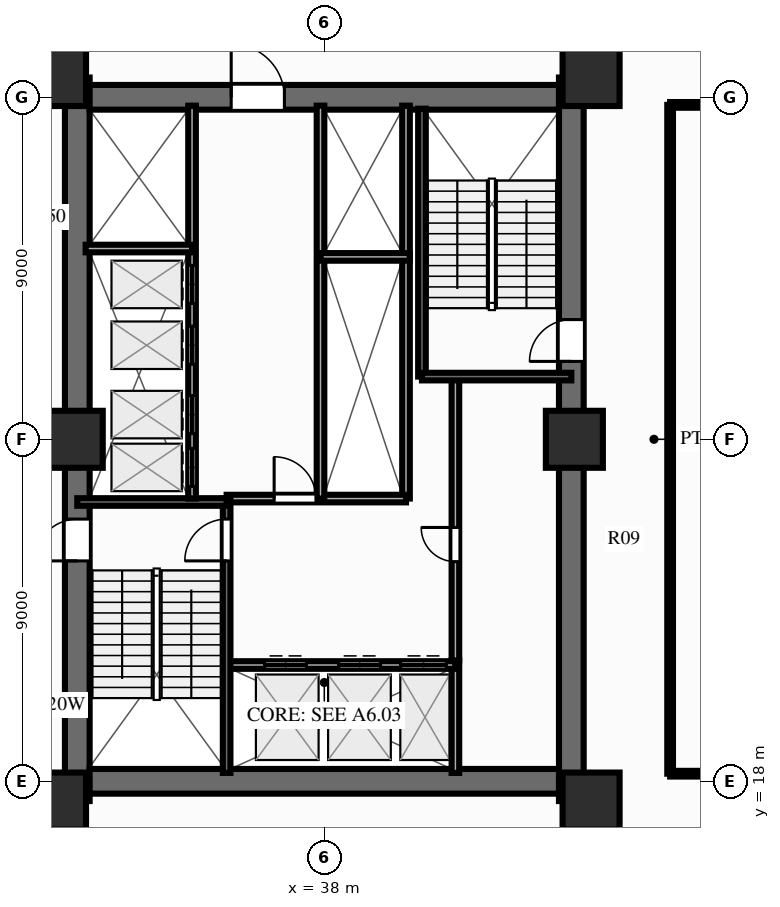
"""IFC4 building model, lengths in metres.
Left out: names, types, materials, properties, quantities, classifications, styles, units other than length and angle.
Written with IfcOpenShell. Run it as: python <this file> out.ifc"""

import sys

from ifc_helpers import new_model, si_unit, direction, frame, frame_2d, origin, origin_2d, place, context, subcontext, project, spatial, rectangle, extrude, source, transform, mapped, element, fill, save


model = new_model("IFC4")
c1 = context("Model", 3, precision=1e-05, world=origin(), true_north=direction((0.0, 1.0)))
c2 = subcontext(c1, "Body", "Model", "MODEL_VIEW")
j1 = project(units=[si_unit("LENGTHUNIT", "METRE"), si_unit("PLANEANGLEUNIT", "RADIAN")], contexts=[c1])
p1 = place(None, origin())
s1 = spatial("IfcSite", under=j1, at=p1, CompositionType="ELEMENT")
p2 = place(p1, origin())
s2 = spatial("IfcBuilding", under=s1, at=p2, CompositionType="ELEMENT")
p3 = place(p2, frame((0.0, 0.0, 15.0)))
s3 = spatial("IfcBuildingStorey", under=s2, at=p3, CompositionType="ELEMENT", Elevation=15.0)
p4 = place(p3, frame((31.5, 17.48, 0.0), z_axis=(0.0, 0.0, 1.0), x_axis=(0.0, 1.0, 0.0)))
e1 = element("IfcWall", 1, at=p4, inside=s3, PredefinedType="SHEAR", context=c2, shape_type="SweptSolid", body=[
    extrude(rectangle(XDim=19.04, YDim=0.65, at=frame_2d((9.52, 0.0))), origin(), (0.0, 0.0, 1.0), 4.4),
])
p5 = place(p4, frame((6.32, 0.0, 0.0)))
e2 = element("IfcOpeningElement", 2, at=p5, cuts=e1, PredefinedType="OPENING", context=c2, shape_type="SweptSolid", body=[
    extrude(rectangle(XDim=1.1, YDim=2.15, at=frame_2d((0.55, 1.075))), frame((0.0, 0.337, 0.0), z_axis=(0.0, -1.0, 0.0), x_axis=(1.0, 0.0, 0.0)), (0.0, 0.0, 1.0), 0.674),
])
p6 = place(p3, frame((44.5, 17.48, 0.0), z_axis=(0.0, 0.0, 1.0), x_axis=(0.0, 1.0, 0.0)))
e3 = element("IfcWall", 3, at=p6, inside=s3, PredefinedType="SHEAR", context=c2, shape_type="SweptSolid", body=[
    extrude(rectangle(XDim=19.04, YDim=0.65, at=frame_2d((9.52, 0.0))), origin(), (0.0, 0.0, 1.0), 4.4),
])
p7 = place(p6, frame((12.67, 0.0, 0.0), z_axis=(0.0, 0.0, 1.0), x_axis=(-1.0, 0.0, 0.0)))
e4 = element("IfcOpeningElement", 4, at=p7, cuts=e3, PredefinedType="OPENING", context=c2, shape_type="SweptSolid", body=[
    extrude(rectangle(XDim=1.1, YDim=2.15, at=frame_2d((0.55, 1.075))), frame((0.0, 0.337, 0.0), z_axis=(0.0, -1.0, 0.0), x_axis=(1.0, 0.0, 0.0)), (0.0, 0.0, 1.0), 0.674),
])
p8 = place(p3, frame((31.825, 18.0, 0.0), z_axis=(0.0, 0.0, 1.0), x_axis=(1.0, 0.0, 0.0)))
e5 = element("IfcWall", 5, at=p8, inside=s3, PredefinedType="SHEAR", context=c2, shape_type="SweptSolid", body=[
    extrude(rectangle(XDim=12.35, YDim=0.65, at=frame_2d((6.175, 0.0))), origin(), (0.0, 0.0, 1.0), 4.4),
])
p9 = place(p3, frame((31.825, 36.0, 0.0), z_axis=(0.0, 0.0, 1.0), x_axis=(1.0, 0.0, 0.0)))
e6 = element("IfcWall", 6, at=p9, inside=s3, PredefinedType="SHEAR", context=c2, shape_type="SweptSolid", body=[
    extrude(rectangle(XDim=12.35, YDim=0.65, at=frame_2d((6.175, 0.0))), origin(), (0.0, 0.0, 1.0), 4.4),
])
p10 = place(p9, frame((5.125, 0.0, 0.0), z_axis=(0.0, 0.0, 1.0), x_axis=(-1.0, 0.0, 0.0)))
e7 = element("IfcOpeningElement", 7, at=p10, cuts=e6, PredefinedType="OPENING", context=c2, shape_type="SweptSolid", body=[
    extrude(rectangle(XDim=1.4, YDim=2.15, at=frame_2d((0.7, 1.075))), frame((0.0, 0.337, 0.0), z_axis=(0.0, -1.0, 0.0), x_axis=(1.0, 0.0, 0.0)), (0.0, 0.0, 1.0), 0.674),
])
m1 = source(origin(), c2, "Body", "SweptSolid", [
    extrude(rectangle(XDim=1.5, YDim=1.5, at=origin_2d()), origin(), (0.0, 0.0, 1.0), 4.4),
])
for number, where, z_axis, x_axis in (
    (8, (30.98, 17.48, 0.0), (0.0, 0.0, 1.0), (1.0, 0.0, 0.0)),
    (9, (45.02, 17.48, 0.0), (0.0, 0.0, 1.0), (1.0, 0.0, 0.0)),
    (10, (30.98, 36.52, 0.0), (0.0, 0.0, 1.0), (1.0, 0.0, 0.0)),
    (11, (45.02, 36.52, 0.0), (0.0, 0.0, 1.0), (1.0, 0.0, 0.0)),
    (12, (31.42, 27.0, 0.0), (0.0, 0.0, 1.0), (1.0, 0.0, 0.0)),
    (13, (44.58, 27.0, 0.0), (0.0, 0.0, 1.0), (1.0, 0.0, 0.0)),
):
    element("IfcColumn", number, at=place(p3, frame(where, z_axis=z_axis, x_axis=x_axis)), inside=s3, PredefinedType="COLUMN", context=c2, shape_type="MappedRepresentation", body=[
        mapped(m1, transform((0.0, 0.0, 0.0), scale=1.0)),
    ])
p11 = place(p3, frame((41.45, 18.22, 0.0), z_axis=(0.0, 0.0, 1.0), x_axis=(0.0, 1.0, 0.0)))
e14 = element("IfcWall", 14, at=p11, inside=s3, PredefinedType="PARTITIONING", context=c2, shape_type="SweptSolid", body=[
    extrude(rectangle(XDim=2.96, YDim=0.2, at=frame_2d((1.48, 0.0))), origin(), (0.0, 0.0, 1.0), 4.08),
])
p12 = place(p3, frame((41.45, 21.18, 0.0), z_axis=(0.0, 0.0, 1.0), x_axis=(0.0, 1.0, 0.0)))
e15 = element("IfcWall", 15, at=p12, inside=s3, PredefinedType="PARTITIONING", context=c2, shape_type="SweptSolid", body=[
    extrude(rectangle(XDim=7.42, YDim=0.2, at=frame_2d((3.71, 0.0))), origin(), (0.0, 0.0, 1.0), 4.08),
])
p13 = place(p12, frame((2.6, 0.0, 0.0)))
e16 = element("IfcOpeningElement", 16, at=p13, cuts=e15, PredefinedType="OPENING", context=c2, shape_type="SweptSolid", body=[
    extrude(rectangle(XDim=0.9, YDim=2.1, at=frame_2d((0.45, 1.05))), frame((0.0, 0.112, 0.0), z_axis=(0.0, -1.0, 0.0), x_axis=(1.0, 0.0, 0.0)), (0.0, 0.0, 1.0), 0.224),
])
p14 = place(p3, frame((40.15, 25.44, 0.0), z_axis=(0.0, 0.0, 1.0), x_axis=(0.0, 1.0, 0.0)))
e17 = element("IfcWall", 17, at=p14, inside=s3, PredefinedType="PARTITIONING", context=c2, shape_type="SweptSolid", body=[
    extrude(rectangle(XDim=6.36, YDim=0.2, at=frame_2d((3.18, 0.0))), origin(), (0.0, 0.0, 1.0), 4.08),
])
p15 = place(p3, frame((40.15, 31.8, 0.0), z_axis=(0.0, 0.0, 1.0), x_axis=(0.0, 1.0, 0.0)))
e18 = element("IfcWall", 18, at=p15, inside=s3, PredefinedType="PARTITIONING", context=c2, shape_type="SweptSolid", body=[
    extrude(rectangle(XDim=3.98, YDim=0.2, at=frame_2d((1.99, 0.0))), origin(), (0.0, 0.0, 1.0), 4.08),
])
p16 = place(p3, frame((35.43, 21.06, 0.0), z_axis=(0.0, 0.0, 1.0), x_axis=(1.0, 0.0, 0.0)))
e19 = element("IfcWall", 19, at=p16, inside=s3, PredefinedType="PARTITIONING", context=c2, shape_type="SweptSolid", body=[
    extrude(rectangle(XDim=6.02, YDim=0.2, at=frame_2d((3.01, 0.0))), origin(), (0.0, 0.0, 1.0), 4.08),
])
p17 = place(p16, frame((1.0, 0.0, 0.0)))
e20 = element("IfcOpeningElement", 20, at=p17, cuts=e19, PredefinedType="OPENING", context=c2, shape_type="SweptSolid", body=[
    extrude(rectangle(XDim=1.1, YDim=2.15, at=frame_2d((0.55, 1.075))), frame((0.0, 0.112, 0.0), z_axis=(0.0, -1.0, 0.0), x_axis=(1.0, 0.0, 0.0)), (0.0, 0.0, 1.0), 0.224),
])
p18 = place(p16, frame((2.95, 0.0, 0.0)))
e21 = element("IfcOpeningElement", 21, at=p18, cuts=e19, PredefinedType="OPENING", context=c2, shape_type="SweptSolid", body=[
    extrude(rectangle(XDim=1.1, YDim=2.15, at=frame_2d((0.55, 1.075))), frame((0.0, 0.112, 0.0), z_axis=(0.0, -1.0, 0.0), x_axis=(1.0, 0.0, 0.0)), (0.0, 0.0, 1.0), 0.224),
])
p19 = place(p16, frame((4.58, 0.0, 0.0)))
e22 = element("IfcOpeningElement", 22, at=p19, cuts=e19, PredefinedType="OPENING", context=c2, shape_type="SweptSolid", body=[
    extrude(rectangle(XDim=1.2, YDim=2.15, at=frame_2d((0.6, 1.075))), frame((0.0, 0.112, 0.0), z_axis=(0.0, -1.0, 0.0), x_axis=(1.0, 0.0, 0.0)), (0.0, 0.0, 1.0), 0.224),
])
p20 = place(p3, frame((35.43, 25.44, 0.0), z_axis=(0.0, 0.0, 1.0), x_axis=(1.0, 0.0, 0.0)))
e23 = element("IfcWall", 23, at=p20, inside=s3, PredefinedType="PARTITIONING", context=c2, shape_type="SweptSolid", body=[
    extrude(rectangle(XDim=4.72, YDim=0.2, at=frame_2d((2.36, 0.0))), origin(), (0.0, 0.0, 1.0), 4.08),
])
p21 = place(p20, frame((1.25, 0.0, 0.0)))
e24 = element("IfcOpeningElement", 24, at=p21, cuts=e23, PredefinedType="OPENING", context=c2, shape_type="SweptSolid", body=[
    extrude(rectangle(XDim=1.1, YDim=2.15, at=frame_2d((0.55, 1.075))), frame((0.0, 0.112, 0.0), z_axis=(0.0, -1.0, 0.0), x_axis=(1.0, 0.0, 0.0)), (0.0, 0.0, 1.0), 0.224),
])
p22 = place(p3, frame((35.43, 18.22, 0.0), z_axis=(0.0, 0.0, 1.0), x_axis=(0.0, 1.0, 0.0)))
e25 = element("IfcWall", 25, at=p22, inside=s3, PredefinedType="SOLIDWALL", context=c2, shape_type="SweptSolid", body=[
    extrude(rectangle(XDim=7.22, YDim=0.2, at=frame_2d((3.61, 0.0))), origin(), (0.0, 0.0, 1.0), 4.19),
])
p23 = place(p22, frame((6.68, 0.0, 0.0), z_axis=(0.0, 0.0, 1.0), x_axis=(-1.0, 0.0, 0.0)))
e26 = element("IfcOpeningElement", 26, at=p23, cuts=e25, PredefinedType="OPENING", context=c2, shape_type="SweptSolid", body=[
    extrude(rectangle(XDim=1.1, YDim=2.15, at=frame_2d((0.55, 1.075))), frame((0.0, 0.112, 0.0), z_axis=(0.0, -1.0, 0.0), x_axis=(1.0, 0.0, 0.0)), (0.0, 0.0, 1.0), 0.224),
])
p24 = place(p3, frame((31.5, 25.35, 0.0), z_axis=(0.0, 0.0, 1.0), x_axis=(1.0, 0.0, 0.0)))
e27 = element("IfcWall", 27, at=p24, inside=s3, PredefinedType="SOLIDWALL", context=c2, shape_type="SweptSolid", body=[
    extrude(rectangle(XDim=3.93, YDim=0.2, at=frame_2d((1.965, 0.0))), origin(), (0.0, 0.0, 1.0), 4.19),
])
p25 = place(p3, frame((40.57, 28.65, 0.0), z_axis=(0.0, 0.0, 1.0), x_axis=(0.0, 1.0, 0.0)))
e28 = element("IfcWall", 28, at=p25, inside=s3, PredefinedType="SOLIDWALL", context=c2, shape_type="SweptSolid", body=[
    extrude(rectangle(XDim=7.05, YDim=0.2, at=frame_2d((3.525, 0.0))), origin(), (0.0, 0.0, 1.0), 4.19),
])
p26 = place(p3, frame((40.57, 28.65, 0.0), z_axis=(0.0, 0.0, 1.0), x_axis=(1.0, 0.0, 0.0)))
e29 = element("IfcWall", 29, at=p26, inside=s3, PredefinedType="SOLIDWALL", context=c2, shape_type="SweptSolid", body=[
    extrude(rectangle(XDim=3.93, YDim=0.2, at=frame_2d((1.965, 0.0))), origin(), (0.0, 0.0, 1.0), 4.19),
])
p27 = place(p3, frame((34.52, 25.44, 0.0), z_axis=(0.0, 0.0, 1.0), x_axis=(0.0, 1.0, 0.0)))
e30 = element("IfcWall", 30, at=p27, inside=s3, PredefinedType="PARTITIONING", context=c2, shape_type="SweptSolid", body=[
    extrude(rectangle(XDim=10.34, YDim=0.2, at=frame_2d((5.17, 0.0))), origin(), (0.0, 0.0, 1.0), 4.08),
])
p28 = place(p27, frame((0.32, 0.0, 0.0)))
e31 = element("IfcOpeningElement", 31, at=p28, cuts=e30, PredefinedType="OPENING", context=c2, shape_type="SweptSolid", body=[
    extrude(rectangle(XDim=1.0, YDim=2.15, at=frame_2d((0.5, 1.075))), frame((0.0, 0.112, 0.0), z_axis=(0.0, -1.0, 0.0), x_axis=(1.0, 0.0, 0.0)), (0.0, 0.0, 1.0), 0.224),
])
p29 = place(p27, frame((1.71, 0.0, 0.0)))
e32 = element("IfcOpeningElement", 32, at=p29, cuts=e30, PredefinedType="OPENING", context=c2, shape_type="SweptSolid", body=[
    extrude(rectangle(XDim=1.0, YDim=2.15, at=frame_2d((0.5, 1.075))), frame((0.0, 0.112, 0.0), z_axis=(0.0, -1.0, 0.0), x_axis=(1.0, 0.0, 0.0)), (0.0, 0.0, 1.0), 0.224),
])
p30 = place(p27, frame((3.535, 0.0, 0.0)))
e33 = element("IfcOpeningElement", 33, at=p30, cuts=e30, PredefinedType="OPENING", context=c2, shape_type="SweptSolid", body=[
    extrude(rectangle(XDim=1.0, YDim=2.15, at=frame_2d((0.5, 1.075))), frame((0.0, 0.112, 0.0), z_axis=(0.0, -1.0, 0.0), x_axis=(1.0, 0.0, 0.0)), (0.0, 0.0, 1.0), 0.224),
])
p31 = place(p27, frame((5.135, 0.0, 0.0)))
e34 = element("IfcOpeningElement", 34, at=p31, cuts=e30, PredefinedType="OPENING", context=c2, shape_type="SweptSolid", body=[
    extrude(rectangle(XDim=1.0, YDim=2.15, at=frame_2d((0.5, 1.075))), frame((0.0, 0.112, 0.0), z_axis=(0.0, -1.0, 0.0), x_axis=(1.0, 0.0, 0.0)), (0.0, 0.0, 1.0), 0.224),
])
p32 = place(p3, frame((31.72, 32.02, 0.0), z_axis=(0.0, 0.0, 1.0), x_axis=(1.0, 0.0, 0.0)))
e35 = element("IfcWall", 35, at=p32, inside=s3, PredefinedType="PARTITIONING", context=c2, shape_type="SweptSolid", body=[
    extrude(rectangle(XDim=2.8, YDim=0.2, at=frame_2d((1.4, 0.0))), origin(), (0.0, 0.0, 1.0), 4.08),
])
p33 = place(p3, frame((37.9, 25.44, 0.0), z_axis=(0.0, 0.0, 1.0), x_axis=(0.0, 1.0, 0.0)))
e36 = element("IfcWall", 36, at=p33, inside=s3, PredefinedType="PARTITIONING", context=c2, shape_type="SweptSolid", body=[
    extrude(rectangle(XDim=10.34, YDim=0.2, at=frame_2d((5.17, 0.0))), origin(), (0.0, 0.0, 1.0), 4.08),
])
p34 = place(p3, frame((37.9, 31.8, 0.0), z_axis=(0.0, 0.0, 1.0), x_axis=(1.0, 0.0, 0.0)))
e37 = element("IfcWall", 37, at=p34, inside=s3, PredefinedType="PARTITIONING", context=c2, shape_type="SweptSolid", body=[
    extrude(rectangle(XDim=2.35, YDim=0.2, at=frame_2d((1.175, 0.0))), origin(), (0.0, 0.0, 1.0), 4.08),
])
for number, where, z_axis, x_axis in (
    (38, (47.1, 18.2, 0.0), (0.0, 0.0, 1.0), (1.0, 0.0, 0.0)),
    (39, (47.1, 35.8, 0.0), (0.0, 0.0, 1.0), (1.0, 0.0, 0.0)),
):
    element("IfcWall", number, at=place(p3, frame(where, z_axis=z_axis, x_axis=x_axis)), inside=s3, PredefinedType="PARTITIONING", context=c2, shape_type="SweptSolid", body=[
        extrude(rectangle(XDim=16.8, YDim=0.15, at=frame_2d((8.4, 0.0))), origin(), (0.0, 0.0, 1.0), 4.08),
    ])
p35 = place(p3, frame((47.1, 18.2, 0.0), z_axis=(0.0, 0.0, 1.0), x_axis=(0.0, 1.0, 0.0)))
e40 = element("IfcWall", 40, at=p35, inside=s3, PredefinedType="PARTITIONING", context=c2, shape_type="SweptSolid", body=[
    extrude(rectangle(XDim=17.6, YDim=0.15, at=frame_2d((8.8, 0.0))), origin(), (0.0, 0.0, 1.0), 4.08),
])
m2 = source(origin(), c2, "Body", "SweptSolid", [
    extrude(rectangle(XDim=1.1, YDim=2.15, at=frame_2d((0.55, 1.075))), frame((0.0, 0.025, 0.0), z_axis=(0.0, -1.0, 0.0), x_axis=(1.0, 0.0, 0.0)), (0.0, 0.0, 1.0), 0.05),
])
p36 = place(p5, origin())
e41 = element("IfcDoor", 41, at=p36, inside=s3, OperationType="SINGLE_SWING_LEFT", PredefinedType="DOOR", context=c2, shape_type="MappedRepresentation", body=[
    mapped(m2, transform((0.0, 0.0, 0.0), scale=1.0)),
])
fill(e2, e41)
p37 = place(p7, origin())
e42 = element("IfcDoor", 42, at=p37, inside=s3, OperationType="SINGLE_SWING_RIGHT", PredefinedType="DOOR", context=c2, shape_type="MappedRepresentation", body=[
    mapped(m2, transform((0.0, 0.0, 0.0), scale=1.0)),
])
fill(e4, e42)
m3 = source(origin(), c2, "Body", "SweptSolid", [
    extrude(rectangle(XDim=1.4, YDim=2.15, at=frame_2d((0.7, 1.075))), frame((0.0, 0.025, 0.0), z_axis=(0.0, -1.0, 0.0), x_axis=(1.0, 0.0, 0.0)), (0.0, 0.0, 1.0), 0.05),
])
p38 = place(p10, origin())
e43 = element("IfcDoor", 43, at=p38, inside=s3, OperationType="SINGLE_SWING_RIGHT", PredefinedType="DOOR", context=c2, shape_type="MappedRepresentation", body=[
    mapped(m3, transform((0.0, 0.0, 0.0), scale=1.0)),
])
fill(e7, e43)
m4 = source(origin(), c2, "Body", "SweptSolid", [
    extrude(rectangle(XDim=0.9, YDim=2.1, at=frame_2d((0.45, 1.05))), frame((0.0, 0.025, 0.0), z_axis=(0.0, -1.0, 0.0), x_axis=(1.0, 0.0, 0.0)), (0.0, 0.0, 1.0), 0.05),
])
p39 = place(p13, origin())
e44 = element("IfcDoor", 44, at=p39, inside=s3, OperationType="SINGLE_SWING_RIGHT", PredefinedType="DOOR", context=c2, shape_type="MappedRepresentation", body=[
    mapped(m4, transform((0.0, 0.0, 0.0), scale=1.0)),
])
fill(e16, e44)
p40 = place(p17, origin())
e45 = element("IfcDoor", 45, at=p40, inside=s3, OperationType="DOUBLE_DOOR_SLIDING", PredefinedType="DOOR", context=c2, shape_type="MappedRepresentation", body=[
    mapped(m2, transform((0.0, 0.0, 0.0), scale=1.0)),
])
fill(e20, e45)
p41 = place(p18, origin())
e46 = element("IfcDoor", 46, at=p41, inside=s3, OperationType="DOUBLE_DOOR_SLIDING", PredefinedType="DOOR", context=c2, shape_type="MappedRepresentation", body=[
    mapped(m2, transform((0.0, 0.0, 0.0), scale=1.0)),
])
fill(e21, e46)
m5 = source(origin(), c2, "Body", "SweptSolid", [
    extrude(rectangle(XDim=1.2, YDim=2.15, at=frame_2d((0.6, 1.075))), frame((0.0, 0.025, 0.0), z_axis=(0.0, -1.0, 0.0), x_axis=(1.0, 0.0, 0.0)), (0.0, 0.0, 1.0), 0.05),
])
p42 = place(p19, origin())
e47 = element("IfcDoor", 47, at=p42, inside=s3, OperationType="DOUBLE_DOOR_SLIDING", PredefinedType="DOOR", context=c2, shape_type="MappedRepresentation", body=[
    mapped(m5, transform((0.0, 0.0, 0.0), scale=1.0)),
])
fill(e22, e47)
p43 = place(p21, origin())
e48 = element("IfcDoor", 48, at=p43, inside=s3, OperationType="SINGLE_SWING_LEFT", PredefinedType="DOOR", context=c2, shape_type="MappedRepresentation", body=[
    mapped(m2, transform((0.0, 0.0, 0.0), scale=1.0)),
])
fill(e24, e48)
p44 = place(p23, origin())
e49 = element("IfcDoor", 49, at=p44, inside=s3, OperationType="SINGLE_SWING_RIGHT", PredefinedType="DOOR", context=c2, shape_type="MappedRepresentation", body=[
    mapped(m2, transform((0.0, 0.0, 0.0), scale=1.0)),
])
fill(e26, e49)
m6 = source(origin(), c2, "Body", "SweptSolid", [
    extrude(rectangle(XDim=1.0, YDim=2.15, at=frame_2d((0.5, 1.075))), frame((0.0, 0.025, 0.0), z_axis=(0.0, -1.0, 0.0), x_axis=(1.0, 0.0, 0.0)), (0.0, 0.0, 1.0), 0.05),
])
p45 = place(p28, origin())
e50 = element("IfcDoor", 50, at=p45, inside=s3, OperationType="DOUBLE_DOOR_SLIDING", PredefinedType="DOOR", context=c2, shape_type="MappedRepresentation", body=[
    mapped(m6, transform((0.0, 0.0, 0.0), scale=1.0)),
])
fill(e31, e50)
p46 = place(p29, origin())
e51 = element("IfcDoor", 51, at=p46, inside=s3, OperationType="DOUBLE_DOOR_SLIDING", PredefinedType="DOOR", context=c2, shape_type="MappedRepresentation", body=[
    mapped(m6, transform((0.0, 0.0, 0.0), scale=1.0)),
])
fill(e32, e51)
p47 = place(p30, origin())
e52 = element("IfcDoor", 52, at=p47, inside=s3, OperationType="DOUBLE_DOOR_SLIDING", PredefinedType="DOOR", context=c2, shape_type="MappedRepresentation", body=[
    mapped(m6, transform((0.0, 0.0, 0.0), scale=1.0)),
])
fill(e33, e52)
p48 = place(p31, origin())
e53 = element("IfcDoor", 53, at=p48, inside=s3, OperationType="DOUBLE_DOOR_SLIDING", PredefinedType="DOOR", context=c2, shape_type="MappedRepresentation", body=[
    mapped(m6, transform((0.0, 0.0, 0.0), scale=1.0)),
])
fill(e34, e53)
save(model, sys.argv[1])
